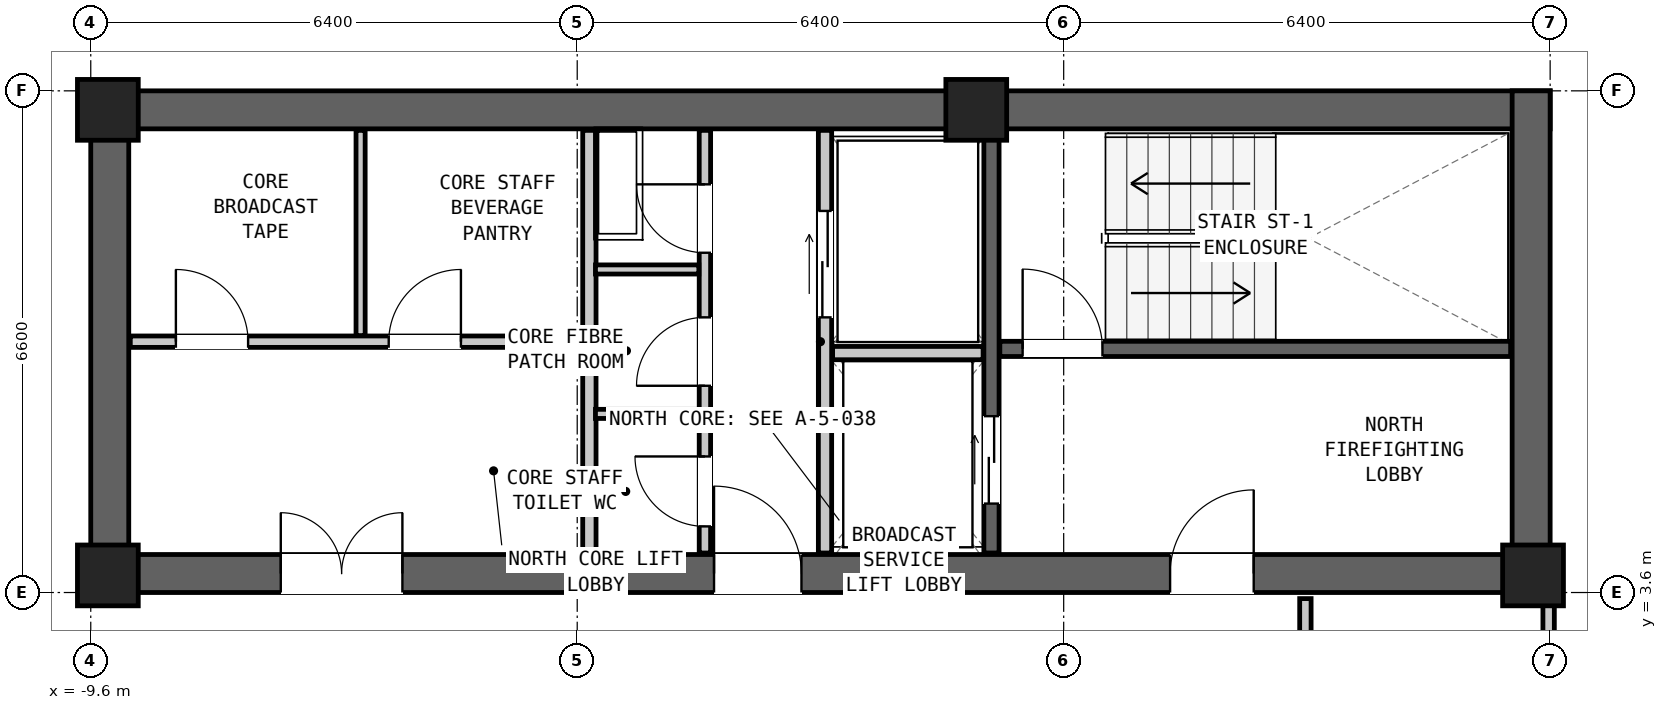
"""IFC4 building model, lengths in metres.
Left out: names, types, materials, properties, quantities, classifications, styles, units other than length and angle.
Written with IfcOpenShell. Run it as: python <this file> out.ifc"""

import sys

from ifc_helpers import new_model, si_unit, direction, frame, frame_2d, origin, origin_2d, place, context, subcontext, project, spatial, rectangle, extrude, element, fill, save


model = new_model("IFC4")
c1 = context("Model", 3, precision=1e-05, world=origin(), true_north=direction((0.0, 1.0)))
c2 = subcontext(c1, "Body", "Model", "MODEL_VIEW")
j1 = project(units=[si_unit("LENGTHUNIT", "METRE"), si_unit("PLANEANGLEUNIT", "RADIAN")], contexts=[c1])
p1 = place(None, origin())
s1 = spatial("IfcSite", under=j1, at=p1, CompositionType="ELEMENT")
p2 = place(p1, origin())
s2 = spatial("IfcBuilding", under=s1, at=p2, CompositionType="ELEMENT")
p3 = place(p2, frame((0.0, 0.0, 121.95)))
s3 = spatial("IfcBuildingStorey", under=s2, at=p3, CompositionType="ELEMENT", Elevation=121.95)
p4 = place(p3, frame((-9.6, 9.95, 0.0), z_axis=(0.0, 0.0, 1.0), x_axis=(1.0, 0.0, 0.0)))
e1 = element("IfcWall", 1, at=p4, inside=s3, PredefinedType="SHEAR", context=c2, shape_type="SweptSolid", body=[
    extrude(rectangle(XDim=19.2, YDim=0.5, at=frame_2d((9.6, 0.0))), origin(), (0.0, 0.0, 1.0), 3.05),
])
p5 = place(p3, frame((-9.6, 3.85, 0.0), z_axis=(0.0, 0.0, 1.0), x_axis=(1.0, 0.0, 0.0)))
e2 = element("IfcWall", 2, at=p5, inside=s3, PredefinedType="SHEAR", context=c2, shape_type="SweptSolid", body=[
    extrude(rectangle(XDim=19.2, YDim=0.5, at=frame_2d((9.6, 0.0))), origin(), (0.0, 0.0, 1.0), 3.05),
])
p6 = place(p5, frame((14.2, 0.0, 0.0)))
e3 = element("IfcOpeningElement", 3, at=p6, cuts=e2, PredefinedType="OPENING", context=c2, shape_type="SweptSolid", body=[
    extrude(rectangle(XDim=1.1, YDim=2.08, at=frame_2d((0.55, 1.04))), frame((0.0, 0.262, 0.0), z_axis=(0.0, -1.0, 0.0), x_axis=(1.0, 0.0, 0.0)), (0.0, 0.0, 1.0), 0.524),
])
p7 = place(p5, frame((8.2, 0.0, 0.0)))
e4 = element("IfcOpeningElement", 4, at=p7, cuts=e2, PredefinedType="OPENING", context=c2, shape_type="SweptSolid", body=[
    extrude(rectangle(XDim=1.15, YDim=2.1, at=frame_2d((0.575, 1.05))), frame((0.0, 0.262, 0.0), z_axis=(0.0, -1.0, 0.0), x_axis=(1.0, 0.0, 0.0)), (0.0, 0.0, 1.0), 0.524),
])
p8 = place(p5, frame((2.5, 0.0, 0.0)))
e5 = element("IfcOpeningElement", 5, at=p8, cuts=e2, PredefinedType="OPENING", context=c2, shape_type="SweptSolid", body=[
    extrude(rectangle(XDim=1.6, YDim=2.12, at=frame_2d((0.8, 1.06))), frame((0.0, 0.262, 0.0), z_axis=(0.0, -1.0, 0.0), x_axis=(1.0, 0.0, 0.0)), (0.0, 0.0, 1.0), 0.524),
])
for number, where, z_axis, x_axis in (
    (6, (-9.35, 3.6, 0.0), (0.0, 0.0, 1.0), (0.0, 1.0, 0.0)),
    (7, (9.35, 3.6, 0.0), (0.0, 0.0, 1.0), (0.0, 1.0, 0.0)),
):
    element("IfcWall", number, at=place(p3, frame(where, z_axis=z_axis, x_axis=x_axis)), inside=s3, PredefinedType="SHEAR", context=c2, shape_type="SweptSolid", body=[
        extrude(rectangle(XDim=6.6, YDim=0.5, at=frame_2d((3.3, 0.0))), origin(), (0.0, 0.0, 1.0), 3.05),
    ])
for number, where, z_axis, x_axis in (
    (8, (-9.375, 9.95, 0.0), (0.0, 0.0, 1.0), (1.0, 0.0, 0.0)),
    (9, (2.05, 9.95, 0.0), (0.0, 0.0, 1.0), (1.0, 0.0, 0.0)),
    (10, (-9.375, 3.825, 0.0), (0.0, 0.0, 1.0), (1.0, 0.0, 0.0)),
    (11, (9.375, 3.825, 0.0), (0.0, 0.0, 1.0), (1.0, 0.0, 0.0)),
):
    element("IfcColumn", number, at=place(p3, frame(where, z_axis=z_axis, x_axis=x_axis)), inside=s3, PredefinedType="COLUMN", context=c2, shape_type="SweptSolid", body=[
        extrude(rectangle(XDim=0.8, YDim=0.8, at=origin_2d()), origin(), (0.0, 0.0, 1.0), 3.05),
    ])
p9 = place(p3, frame((2.36, 6.805, 0.0), z_axis=(0.0, 0.0, 1.0), x_axis=(1.0, 0.0, 0.0)))
e12 = element("IfcWall", 12, at=p9, inside=s3, PredefinedType="SHEAR", context=c2, shape_type="SweptSolid", body=[
    extrude(rectangle(XDim=6.72, YDim=0.2, at=frame_2d((3.36, 0.0))), origin(), (0.0, 0.0, 1.0), 2.83),
])
p10 = place(p9, frame((0.3, 0.0, 0.0)))
e13 = element("IfcOpeningElement", 13, at=p10, cuts=e12, PredefinedType="OPENING", context=c2, shape_type="SweptSolid", body=[
    extrude(rectangle(XDim=1.05, YDim=2.08, at=frame_2d((0.525, 1.04))), frame((0.0, 0.112, 0.0), z_axis=(0.0, -1.0, 0.0), x_axis=(1.0, 0.0, 0.0)), (0.0, 0.0, 1.0), 0.224),
])
p11 = place(p3, frame((2.25, 4.12, 0.0), z_axis=(0.0, 0.0, 1.0), x_axis=(0.0, 1.0, 0.0)))
e14 = element("IfcWall", 14, at=p11, inside=s3, PredefinedType="SHEAR", context=c2, shape_type="SweptSolid", body=[
    extrude(rectangle(XDim=5.56, YDim=0.2, at=frame_2d((2.78, 0.0))), origin(), (0.0, 0.0, 1.0), 2.83),
])
p12 = place(p11, frame((0.65, 0.0, 0.0)))
e15 = element("IfcOpeningElement", 15, at=p12, cuts=e14, PredefinedType="OPENING", context=c2, shape_type="SweptSolid", body=[
    extrude(rectangle(XDim=1.15, YDim=2.08, at=frame_2d((0.575, 1.04))), frame((0.0, 0.112, 0.0), z_axis=(0.0, -1.0, 0.0), x_axis=(1.0, 0.0, 0.0)), (0.0, 0.0, 1.0), 0.224),
])
p13 = place(p3, frame((0.06, 4.12, 0.0), z_axis=(0.0, 0.0, 1.0), x_axis=(0.0, 1.0, 0.0)))
e16 = element("IfcWall", 16, at=p13, inside=s3, PredefinedType="PARTITIONING", context=c2, shape_type="SweptSolid", body=[
    extrude(rectangle(XDim=5.56, YDim=0.175, at=frame_2d((2.78, 0.0))), origin(), (0.0, 0.0, 1.0), 2.83),
])
p14 = place(p13, frame((3.1, 0.0, 0.0)))
e17 = element("IfcOpeningElement", 17, at=p14, cuts=e16, PredefinedType="OPENING", context=c2, shape_type="SweptSolid", body=[
    extrude(rectangle(XDim=1.4, YDim=2.12, at=frame_2d((0.7, 1.06))), frame((0.0, 0.1, 0.0), z_axis=(0.0, -1.0, 0.0), x_axis=(1.0, 0.0, 0.0)), (0.0, 0.0, 1.0), 0.199),
])
p15 = place(p3, frame((0.16, 6.75, 0.0), z_axis=(0.0, 0.0, 1.0), x_axis=(1.0, 0.0, 0.0)))
e18 = element("IfcWall", 18, at=p15, inside=s3, PredefinedType="PARTITIONING", context=c2, shape_type="SweptSolid", body=[
    extrude(rectangle(XDim=1.98, YDim=0.175, at=frame_2d((0.99, 0.0))), origin(), (0.0, 0.0, 1.0), 2.83),
])
p16 = place(p3, frame((-3.04, 4.12, 0.0), z_axis=(0.0, 0.0, 1.0), x_axis=(0.0, 1.0, 0.0)))
e19 = element("IfcWall", 19, at=p16, inside=s3, PredefinedType="PARTITIONING", context=c2, shape_type="SweptSolid", body=[
    extrude(rectangle(XDim=5.56, YDim=0.175, at=frame_2d((2.78, 0.0))), origin(), (0.0, 0.0, 1.0), 2.83),
])
p17 = place(p3, frame((-1.52, 4.12, 0.0), z_axis=(0.0, 0.0, 1.0), x_axis=(0.0, 1.0, 0.0)))
e20 = element("IfcWall", 20, at=p17, inside=s3, PredefinedType="PARTITIONING", context=c2, shape_type="SweptSolid", body=[
    extrude(rectangle(XDim=5.56, YDim=0.15, at=frame_2d((2.78, 0.0))), origin(), (0.0, 0.0, 1.0), 2.83),
])
p18 = place(p17, frame((3.95, 0.0, 0.0)))
e21 = element("IfcOpeningElement", 21, at=p18, cuts=e20, PredefinedType="OPENING", context=c2, shape_type="SweptSolid", body=[
    extrude(rectangle(XDim=0.9, YDim=2.05, at=frame_2d((0.45, 1.025))), frame((0.0, 0.087, 0.0), z_axis=(0.0, -1.0, 0.0), x_axis=(1.0, 0.0, 0.0)), (0.0, 0.0, 1.0), 0.174),
])
p19 = place(p17, frame((2.2, 0.0, 0.0)))
e22 = element("IfcOpeningElement", 22, at=p19, cuts=e20, PredefinedType="OPENING", context=c2, shape_type="SweptSolid", body=[
    extrude(rectangle(XDim=0.9, YDim=2.05, at=frame_2d((0.45, 1.025))), frame((0.0, 0.087, 0.0), z_axis=(0.0, -1.0, 0.0), x_axis=(1.0, 0.0, 0.0)), (0.0, 0.0, 1.0), 0.174),
])
p20 = place(p17, frame((0.35, 0.0, 0.0)))
e23 = element("IfcOpeningElement", 23, at=p20, cuts=e20, PredefinedType="OPENING", context=c2, shape_type="SweptSolid", body=[
    extrude(rectangle(XDim=0.92, YDim=2.1, at=frame_2d((0.46, 1.05))), frame((0.0, 0.087, 0.0), z_axis=(0.0, -1.0, 0.0), x_axis=(1.0, 0.0, 0.0)), (0.0, 0.0, 1.0), 0.174),
])
for number, where, z_axis, x_axis in (
    (24, (-2.96, 5.95, 0.0), (0.0, 0.0, 1.0), (1.0, 0.0, 0.0)),
    (25, (-2.96, 7.85, 0.0), (0.0, 0.0, 1.0), (1.0, 0.0, 0.0)),
):
    element("IfcWall", number, at=place(p3, frame(where, z_axis=z_axis, x_axis=x_axis)), inside=s3, PredefinedType="PARTITIONING", context=c2, shape_type="SweptSolid", body=[
        extrude(rectangle(XDim=1.36, YDim=0.12, at=frame_2d((0.68, 0.0))), origin(), (0.0, 0.0, 1.0), 2.83),
    ])
p21 = place(p3, frame((-9.08, 6.9, 0.0), z_axis=(0.0, 0.0, 1.0), x_axis=(1.0, 0.0, 0.0)))
e26 = element("IfcWall", 26, at=p21, inside=s3, PredefinedType="PARTITIONING", context=c2, shape_type="SweptSolid", body=[
    extrude(rectangle(XDim=5.96, YDim=0.15, at=frame_2d((2.98, 0.0))), origin(), (0.0, 0.0, 1.0), 2.83),
])
p22 = place(p21, frame((0.6, 0.0, 0.0)))
e27 = element("IfcOpeningElement", 27, at=p22, cuts=e26, PredefinedType="OPENING", context=c2, shape_type="SweptSolid", body=[
    extrude(rectangle(XDim=0.95, YDim=2.1, at=frame_2d((0.475, 1.05))), frame((0.0, 0.087, 0.0), z_axis=(0.0, -1.0, 0.0), x_axis=(1.0, 0.0, 0.0)), (0.0, 0.0, 1.0), 0.174),
])
p23 = place(p21, frame((3.4, 0.0, 0.0)))
e28 = element("IfcOpeningElement", 28, at=p23, cuts=e26, PredefinedType="OPENING", context=c2, shape_type="SweptSolid", body=[
    extrude(rectangle(XDim=0.95, YDim=2.1, at=frame_2d((0.475, 1.05))), frame((0.0, 0.087, 0.0), z_axis=(0.0, -1.0, 0.0), x_axis=(1.0, 0.0, 0.0)), (0.0, 0.0, 1.0), 0.174),
])
p24 = place(p3, frame((-6.05, 6.98, 0.0), z_axis=(0.0, 0.0, 1.0), x_axis=(0.0, 1.0, 0.0)))
e29 = element("IfcWall", 29, at=p24, inside=s3, PredefinedType="PARTITIONING", context=c2, shape_type="SweptSolid", body=[
    extrude(rectangle(XDim=2.7, YDim=0.12, at=frame_2d((1.35, 0.0))), origin(), (0.0, 0.0, 1.0), 2.83),
])
p25 = place(p3, frame((6.38, -2.32, 0.0), z_axis=(0.0, 0.0, 1.0), x_axis=(0.0, 1.0, 0.0)))
e30 = element("IfcWall", 30, at=p25, inside=s3, PredefinedType="PARTITIONING", context=c2, shape_type="SweptSolid", body=[
    extrude(rectangle(XDim=5.84, YDim=0.15, at=frame_2d((2.92, 0.0))), origin(), (0.0, 0.0, 1.0), 2.198),
])
p26 = place(p3, frame((9.58, -2.32, 0.0), z_axis=(0.0, 0.0, 1.0), x_axis=(0.0, 1.0, 0.0)))
e31 = element("IfcWall", 31, at=p26, inside=s3, PredefinedType="PARTITIONING", context=c2, shape_type="SweptSolid", body=[
    extrude(rectangle(XDim=5.84, YDim=0.15, at=frame_2d((2.92, 0.0))), origin(), (0.0, 0.0, 1.0), 2.198),
])
p27 = place(p26, frame((2.445, 0.0, 0.0)))
e32 = element("IfcOpeningElement", 32, at=p27, cuts=e31, PredefinedType="OPENING", context=c2, shape_type="SweptSolid", body=[
    extrude(rectangle(XDim=0.95, YDim=2.1, at=frame_2d((0.475, 1.05))), frame((0.0, 0.087, 0.0), z_axis=(0.0, -1.0, 0.0), x_axis=(1.0, 0.0, 0.0)), (0.0, 0.0, 1.0), 0.174),
])
p28 = place(p10, origin())
e33 = element("IfcDoor", 33, at=p28, inside=s3, OperationType="SINGLE_SWING_LEFT", PredefinedType="DOOR", context=c2, shape_type="SweptSolid", body=[
    extrude(rectangle(XDim=1.05, YDim=2.08, at=frame_2d((0.525, 1.04))), frame((0.0, 0.025, 0.0), z_axis=(0.0, -1.0, 0.0), x_axis=(1.0, 0.0, 0.0)), (0.0, 0.0, 1.0), 0.05),
])
fill(e13, e33)
p29 = place(p6, origin())
e34 = element("IfcDoor", 34, at=p29, inside=s3, OperationType="SINGLE_SWING_RIGHT", PredefinedType="DOOR", context=c2, shape_type="SweptSolid", body=[
    extrude(rectangle(XDim=1.1, YDim=2.08, at=frame_2d((0.55, 1.04))), frame((0.0, 0.025, 0.0), z_axis=(0.0, -1.0, 0.0), x_axis=(1.0, 0.0, 0.0)), (0.0, 0.0, 1.0), 0.05),
])
fill(e3, e34)
p30 = place(p12, origin())
e35 = element("IfcDoor", 35, at=p30, inside=s3, OperationType="DOUBLE_DOOR_SLIDING", PredefinedType="DOOR", context=c2, shape_type="SweptSolid", body=[
    extrude(rectangle(XDim=1.15, YDim=2.08, at=frame_2d((0.575, 1.04))), frame((0.0, 0.025, 0.0), z_axis=(0.0, -1.0, 0.0), x_axis=(1.0, 0.0, 0.0)), (0.0, 0.0, 1.0), 0.05),
])
fill(e15, e35)
p31 = place(p14, origin())
e36 = element("IfcDoor", 36, at=p31, inside=s3, OperationType="DOUBLE_DOOR_SLIDING", PredefinedType="DOOR", context=c2, shape_type="SweptSolid", body=[
    extrude(rectangle(XDim=1.4, YDim=2.12, at=frame_2d((0.7, 1.06))), frame((0.0, 0.025, 0.0), z_axis=(0.0, -1.0, 0.0), x_axis=(1.0, 0.0, 0.0)), (0.0, 0.0, 1.0), 0.05),
])
fill(e17, e36)
p32 = place(p7, origin())
e37 = element("IfcDoor", 37, at=p32, inside=s3, OperationType="SINGLE_SWING_LEFT", PredefinedType="DOOR", context=c2, shape_type="SweptSolid", body=[
    extrude(rectangle(XDim=1.15, YDim=2.1, at=frame_2d((0.575, 1.05))), frame((0.0, 0.025, 0.0), z_axis=(0.0, -1.0, 0.0), x_axis=(1.0, 0.0, 0.0)), (0.0, 0.0, 1.0), 0.05),
])
fill(e4, e37)
p33 = place(p18, origin())
e38 = element("IfcDoor", 38, at=p33, inside=s3, OperationType="SINGLE_SWING_RIGHT", PredefinedType="DOOR", context=c2, shape_type="SweptSolid", body=[
    extrude(rectangle(XDim=0.9, YDim=2.05, at=frame_2d((0.45, 1.025))), frame((0.0, 0.025, 0.0), z_axis=(0.0, -1.0, 0.0), x_axis=(1.0, 0.0, 0.0)), (0.0, 0.0, 1.0), 0.05),
])
fill(e21, e38)
p34 = place(p19, origin())
e39 = element("IfcDoor", 39, at=p34, inside=s3, OperationType="SINGLE_SWING_LEFT", PredefinedType="DOOR", context=c2, shape_type="SweptSolid", body=[
    extrude(rectangle(XDim=0.9, YDim=2.05, at=frame_2d((0.45, 1.025))), frame((0.0, 0.025, 0.0), z_axis=(0.0, -1.0, 0.0), x_axis=(1.0, 0.0, 0.0)), (0.0, 0.0, 1.0), 0.05),
])
fill(e22, e39)
p35 = place(p20, origin())
e40 = element("IfcDoor", 40, at=p35, inside=s3, OperationType="SINGLE_SWING_RIGHT", PredefinedType="DOOR", context=c2, shape_type="SweptSolid", body=[
    extrude(rectangle(XDim=0.92, YDim=2.1, at=frame_2d((0.46, 1.05))), frame((0.0, 0.025, 0.0), z_axis=(0.0, -1.0, 0.0), x_axis=(1.0, 0.0, 0.0)), (0.0, 0.0, 1.0), 0.05),
])
fill(e23, e40)
p36 = place(p8, origin())
e41 = element("IfcDoor", 41, at=p36, inside=s3, OperationType="DOUBLE_DOOR_SINGLE_SWING", PredefinedType="DOOR", context=c2, shape_type="SweptSolid", body=[
    extrude(rectangle(XDim=1.6, YDim=2.12, at=frame_2d((0.8, 1.06))), frame((0.0, 0.025, 0.0), z_axis=(0.0, -1.0, 0.0), x_axis=(1.0, 0.0, 0.0)), (0.0, 0.0, 1.0), 0.05),
])
fill(e5, e41)
p37 = place(p22, origin())
e42 = element("IfcDoor", 42, at=p37, inside=s3, OperationType="SINGLE_SWING_LEFT", PredefinedType="DOOR", context=c2, shape_type="SweptSolid", body=[
    extrude(rectangle(XDim=0.95, YDim=2.1, at=frame_2d((0.475, 1.05))), frame((0.0, 0.025, 0.0), z_axis=(0.0, -1.0, 0.0), x_axis=(1.0, 0.0, 0.0)), (0.0, 0.0, 1.0), 0.05),
])
fill(e27, e42)
p38 = place(p23, origin())
e43 = element("IfcDoor", 43, at=p38, inside=s3, OperationType="SINGLE_SWING_RIGHT", PredefinedType="DOOR", context=c2, shape_type="SweptSolid", body=[
    extrude(rectangle(XDim=0.95, YDim=2.1, at=frame_2d((0.475, 1.05))), frame((0.0, 0.025, 0.0), z_axis=(0.0, -1.0, 0.0), x_axis=(1.0, 0.0, 0.0)), (0.0, 0.0, 1.0), 0.05),
])
fill(e28, e43)
save(model, sys.argv[1])
